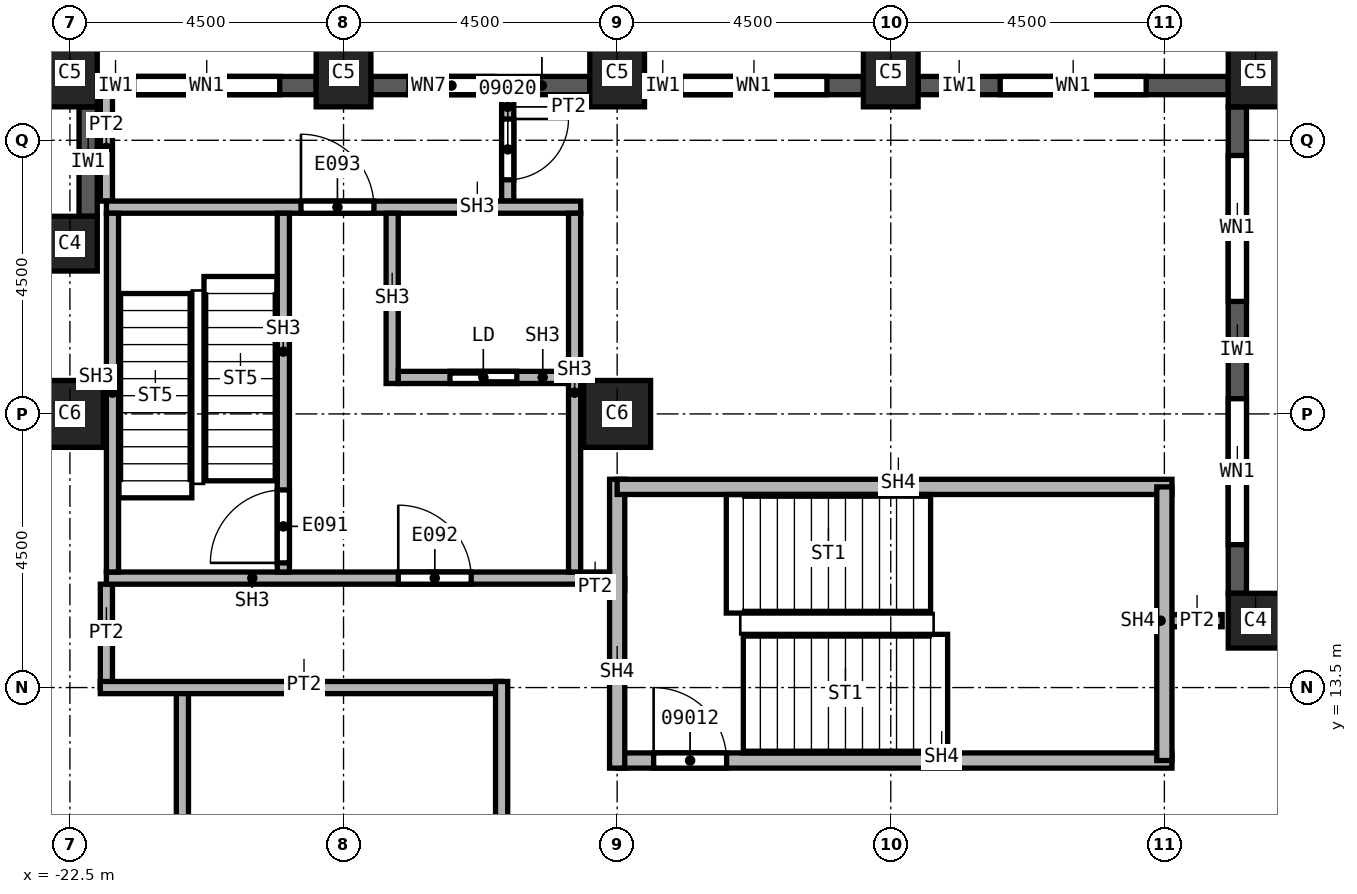
"""IFC4 building model, lengths in metres.
Left out: names, types, materials, properties, quantities, classifications, styles, units other than length and angle.
Written with IfcOpenShell. Run it as: python <this file> out.ifc"""

import sys

from ifc_helpers import new_model, si_unit, direction, frame, frame_2d, origin, origin_2d, place, context, subcontext, project, spatial, rectangle, extrude, element, fill, save


model = new_model("IFC4")
c1 = context("Model", 3, precision=1e-05, world=origin(), true_north=direction((0.0, 1.0)))
c2 = subcontext(c1, "Body", "Model", "MODEL_VIEW")
j1 = project(units=[si_unit("LENGTHUNIT", "METRE"), si_unit("PLANEANGLEUNIT", "RADIAN")], contexts=[c1])
p1 = place(None, origin())
s1 = spatial("IfcSite", under=j1, at=p1, CompositionType="ELEMENT")
p2 = place(p1, origin())
s2 = spatial("IfcBuilding", under=s1, at=p2, CompositionType="ELEMENT")
p3 = place(p2, frame((0.0, 0.0, 162.0)))
s3 = spatial("IfcBuildingStorey", under=s2, at=p3, CompositionType="ELEMENT", Elevation=162.0)
for number, where, z_axis, x_axis in (
    (1, (-13.5, 18.0, 0.0), (0.0, 0.0, 1.0), (1.0, 0.0, 0.0)),
    (2, (-22.5, 18.0, 0.0), (0.0, 0.0, 1.0), (1.0, 0.0, 0.0)),
):
    element("IfcColumn", number, at=place(p3, frame(where, z_axis=z_axis, x_axis=x_axis)), inside=s3, PredefinedType="COLUMN", context=c2, shape_type="SweptSolid", body=[
        extrude(rectangle(XDim=1.1, YDim=1.1, at=origin_2d()), origin(), (0.0, 0.0, 1.0), 3.7),
    ])
for number, where, z_axis, x_axis in (
    (3, (-3.0, 23.6, 0.0), (0.0, 0.0, 1.0), (1.0, 0.0, 0.0)),
    (4, (-9.0, 23.6, 0.0), (0.0, 0.0, 1.0), (1.0, 0.0, 0.0)),
    (5, (-13.5, 23.6, 0.0), (0.0, 0.0, 1.0), (1.0, 0.0, 0.0)),
    (6, (-18.0, 23.6, 0.0), (0.0, 0.0, 1.0), (1.0, 0.0, 0.0)),
    (7, (-22.5, 23.6, 0.0), (0.0, 0.0, 1.0), (1.0, 0.0, 0.0)),
):
    element("IfcColumn", number, at=place(p3, frame(where, z_axis=z_axis, x_axis=x_axis)), inside=s3, PredefinedType="COLUMN", context=c2, shape_type="SweptSolid", body=[
        extrude(rectangle(XDim=0.9, YDim=1.1, at=origin_2d()), origin(), (0.0, 0.0, 1.0), 3.7),
    ])
for number, where, z_axis, x_axis in (
    (8, (-3.0, 14.6, 0.0), (0.0, 0.0, 1.0), (1.0, 0.0, 0.0)),
    (9, (-22.5, 20.8, 0.0), (0.0, 0.0, 1.0), (1.0, 0.0, 0.0)),
):
    element("IfcColumn", number, at=place(p3, frame(where, z_axis=z_axis, x_axis=x_axis)), inside=s3, PredefinedType="COLUMN", context=c2, shape_type="SweptSolid", body=[
        extrude(rectangle(XDim=0.9, YDim=0.9, at=origin_2d()), origin(), (0.0, 0.0, 1.0), 3.7),
    ])
p4 = place(p3, frame((-22.2, 23.05, 0.0), z_axis=(0.0, 0.0, 1.0), x_axis=(0.0, -1.0, 0.0)))
e10 = element("IfcWall", 10, at=p4, inside=s3, PredefinedType="SOLIDWALL", context=c2, shape_type="SweptSolid", body=[
    extrude(rectangle(XDim=1.8, YDim=0.3, at=frame_2d((0.9, 0.0))), origin(), (0.0, 0.0, 1.0), 3.1),
])
p5 = place(p3, frame((-3.3, 15.05, 0.0), z_axis=(0.0, 0.0, 1.0), x_axis=(0.0, 1.0, 0.0)))
e11 = element("IfcWall", 11, at=p5, inside=s3, PredefinedType="SOLIDWALL", context=c2, shape_type="SweptSolid", body=[
    extrude(rectangle(XDim=8.0, YDim=0.3, at=frame_2d((4.0, 0.0))), origin(), (0.0, 0.0, 1.0), 3.1),
])
p6 = place(p5, frame((0.8, 0.0, 0.8)))
e12 = element("IfcOpeningElement", 12, at=p6, cuts=e11, PredefinedType="OPENING", context=c2, shape_type="SweptSolid", body=[
    extrude(rectangle(XDim=2.4, YDim=1.95, at=frame_2d((1.2, 0.975))), frame((0.0, 0.15, 0.0), z_axis=(0.0, -1.0, 0.0), x_axis=(1.0, 0.0, 0.0)), (0.0, 0.0, 1.0), 0.3),
])
p7 = place(p5, frame((4.8, 0.0, 0.8)))
e13 = element("IfcOpeningElement", 13, at=p7, cuts=e11, PredefinedType="OPENING", context=c2, shape_type="SweptSolid", body=[
    extrude(rectangle(XDim=2.4, YDim=1.95, at=frame_2d((1.2, 0.975))), frame((0.0, 0.15, 0.0), z_axis=(0.0, -1.0, 0.0), x_axis=(1.0, 0.0, 0.0)), (0.0, 0.0, 1.0), 0.3),
])
p8 = place(p3, frame((-3.45, 23.4, 0.0), z_axis=(0.0, 0.0, 1.0), x_axis=(-1.0, 0.0, 0.0)))
e14 = element("IfcWall", 14, at=p8, inside=s3, PredefinedType="SOLIDWALL", context=c2, shape_type="SweptSolid", body=[
    extrude(rectangle(XDim=5.1, YDim=0.3, at=frame_2d((2.55, 0.0))), origin(), (0.0, 0.0, 1.0), 3.1),
])
p9 = place(p8, frame((1.35, 0.0, 0.8)))
e15 = element("IfcOpeningElement", 15, at=p9, cuts=e14, PredefinedType="OPENING", context=c2, shape_type="SweptSolid", body=[
    extrude(rectangle(XDim=2.4, YDim=1.95, at=frame_2d((1.2, 0.975))), frame((0.0, 0.15, 0.0), z_axis=(0.0, -1.0, 0.0), x_axis=(1.0, 0.0, 0.0)), (0.0, 0.0, 1.0), 0.3),
])
p10 = place(p3, frame((-9.45, 23.4, 0.0), z_axis=(0.0, 0.0, 1.0), x_axis=(-1.0, 0.0, 0.0)))
e16 = element("IfcWall", 16, at=p10, inside=s3, PredefinedType="SOLIDWALL", context=c2, shape_type="SweptSolid", body=[
    extrude(rectangle(XDim=3.6, YDim=0.3, at=frame_2d((1.8, 0.0))), origin(), (0.0, 0.0, 1.0), 3.1),
])
p11 = place(p10, frame((0.6, 0.0, 0.8)))
e17 = element("IfcOpeningElement", 17, at=p11, cuts=e16, PredefinedType="OPENING", context=c2, shape_type="SweptSolid", body=[
    extrude(rectangle(XDim=2.4, YDim=1.95, at=frame_2d((1.2, 0.975))), frame((0.0, 0.15, 0.0), z_axis=(0.0, -1.0, 0.0), x_axis=(1.0, 0.0, 0.0)), (0.0, 0.0, 1.0), 0.3),
])
p12 = place(p3, frame((-13.95, 23.4, 0.0), z_axis=(0.0, 0.0, 1.0), x_axis=(-1.0, 0.0, 0.0)))
e18 = element("IfcWall", 18, at=p12, inside=s3, PredefinedType="SOLIDWALL", context=c2, shape_type="SweptSolid", body=[
    extrude(rectangle(XDim=3.6, YDim=0.3, at=frame_2d((1.8, 0.0))), origin(), (0.0, 0.0, 1.0), 3.1),
])
p13 = place(p12, frame((1.575, 0.0, 0.8)))
e19 = element("IfcOpeningElement", 19, at=p13, cuts=e18, PredefinedType="OPENING", context=c2, shape_type="SweptSolid", body=[
    extrude(rectangle(XDim=1.4, YDim=1.95, at=frame_2d((0.7, 0.975))), frame((0.0, 0.15, 0.0), z_axis=(0.0, -1.0, 0.0), x_axis=(1.0, 0.0, 0.0)), (0.0, 0.0, 1.0), 0.3),
])
p14 = place(p3, frame((-18.45, 23.4, 0.0), z_axis=(0.0, 0.0, 1.0), x_axis=(-1.0, 0.0, 0.0)))
e20 = element("IfcWall", 20, at=p14, inside=s3, PredefinedType="SOLIDWALL", context=c2, shape_type="SweptSolid", body=[
    extrude(rectangle(XDim=3.6, YDim=0.3, at=frame_2d((1.8, 0.0))), origin(), (0.0, 0.0, 1.0), 3.1),
])
p15 = place(p14, frame((0.6, 0.0, 0.8)))
e21 = element("IfcOpeningElement", 21, at=p15, cuts=e20, PredefinedType="OPENING", context=c2, shape_type="SweptSolid", body=[
    extrude(rectangle(XDim=2.4, YDim=1.95, at=frame_2d((1.2, 0.975))), frame((0.0, 0.15, 0.0), z_axis=(0.0, -1.0, 0.0), x_axis=(1.0, 0.0, 0.0)), (0.0, 0.0, 1.0), 0.3),
])
p16 = place(p3, frame((-21.9, 13.5, 0.0), z_axis=(0.0, 0.0, 1.0), x_axis=(0.0, 1.0, 0.0)))
e22 = element("IfcWall", 22, at=p16, inside=s3, PredefinedType="PARTITIONING", context=c2, shape_type="SweptSolid", body=[
    extrude(rectangle(XDim=1.7, YDim=0.2, at=frame_2d((0.85, 0.0))), origin(), (0.0, 0.0, 1.0), 3.7),
])
p17 = place(p3, frame((-21.9, 21.5, 0.0), z_axis=(0.0, 0.0, 1.0), x_axis=(0.0, 1.0, 0.0)))
e23 = element("IfcWall", 23, at=p17, inside=s3, PredefinedType="PARTITIONING", context=c2, shape_type="SweptSolid", body=[
    extrude(rectangle(XDim=1.75, YDim=0.2, at=frame_2d((0.875, 0.0))), origin(), (0.0, 0.0, 1.0), 3.7),
])
p18 = place(p3, frame((-20.65, 3.75, 0.0), z_axis=(0.0, 0.0, 1.0), x_axis=(0.0, 1.0, 0.0)))
e24 = element("IfcWall", 24, at=p18, inside=s3, PredefinedType="PARTITIONING", context=c2, shape_type="SweptSolid", body=[
    extrude(rectangle(XDim=9.75, YDim=0.2, at=frame_2d((4.875, 0.0))), origin(), (0.0, 0.0, 1.0), 3.7),
])
p19 = place(p18, frame((2.65, 0.0, 0.0)))
e25 = element("IfcOpeningElement", 25, at=p19, cuts=e24, PredefinedType="OPENING", context=c2, shape_type="SweptSolid", body=[
    extrude(rectangle(XDim=1.0, YDim=2.1, at=frame_2d((0.5, 1.05))), frame((0.0, 0.1, 0.0), z_axis=(0.0, -1.0, 0.0), x_axis=(1.0, 0.0, 0.0)), (0.0, 0.0, 1.0), 0.2),
])
p20 = place(p3, frame((-15.4, 13.5, 0.0), z_axis=(0.0, 0.0, 1.0), x_axis=(-1.0, 0.0, 0.0)))
e26 = element("IfcWall", 26, at=p20, inside=s3, PredefinedType="PARTITIONING", context=c2, shape_type="SweptSolid", body=[
    extrude(rectangle(XDim=6.6, YDim=0.2, at=frame_2d((3.3, 0.0))), origin(), (0.0, 0.0, 1.0), 3.7),
])
p21 = place(p3, frame((-15.4, 3.65, 0.0), z_axis=(0.0, 0.0, 1.0), x_axis=(0.0, 1.0, 0.0)))
e27 = element("IfcWall", 27, at=p21, inside=s3, PredefinedType="PARTITIONING", context=c2, shape_type="SweptSolid", body=[
    extrude(rectangle(XDim=9.95, YDim=0.2, at=frame_2d((4.975, 0.0))), origin(), (0.0, 0.0, 1.0), 3.7),
])
p22 = place(p21, frame((3.55, 0.0, 0.0)))
e28 = element("IfcOpeningElement", 28, at=p22, cuts=e27, PredefinedType="OPENING", context=c2, shape_type="SweptSolid", body=[
    extrude(rectangle(XDim=1.0, YDim=2.1, at=frame_2d((0.5, 1.05))), frame((0.0, 0.1, 0.0), z_axis=(0.0, -1.0, 0.0), x_axis=(1.0, 0.0, 0.0)), (0.0, 0.0, 1.0), 0.2),
])
p23 = place(p3, frame((-15.3, 23.25, 0.0), z_axis=(0.0, 0.0, 1.0), x_axis=(0.0, -1.0, 0.0)))
e29 = element("IfcWall", 29, at=p23, inside=s3, PredefinedType="PARTITIONING", context=c2, shape_type="SweptSolid", body=[
    extrude(rectangle(XDim=1.75, YDim=0.2, at=frame_2d((0.875, 0.0))), origin(), (0.0, 0.0, 1.0), 3.7),
])
p24 = place(p23, frame((0.4, 0.0, 0.0)))
e30 = element("IfcOpeningElement", 30, at=p24, cuts=e29, PredefinedType="OPENING", context=c2, shape_type="SweptSolid", body=[
    extrude(rectangle(XDim=1.0, YDim=2.1, at=frame_2d((0.5, 1.05))), frame((0.0, 0.1, 0.0), z_axis=(0.0, -1.0, 0.0), x_axis=(1.0, 0.0, 0.0)), (0.0, 0.0, 1.0), 0.2),
])
p25 = place(p3, frame((-14.1, 15.2, 0.0), z_axis=(0.0, 0.0, 1.0), x_axis=(1.0, 0.0, 0.0)))
e31 = element("IfcWall", 31, at=p25, inside=s3, PredefinedType="PARTITIONING", context=c2, shape_type="SweptSolid", body=[
    extrude(rectangle(XDim=0.725, YDim=0.2, at=frame_2d((0.363, 0.0))), origin(), (0.0, 0.0, 1.0), 3.7),
])
p26 = place(p3, frame((-4.5, 14.6, 0.0), z_axis=(0.0, 0.0, 1.0), x_axis=(1.0, 0.0, 0.0)))
e32 = element("IfcWall", 32, at=p26, inside=s3, PredefinedType="PARTITIONING", context=c2, shape_type="SweptSolid", body=[
    extrude(rectangle(XDim=0.95, YDim=0.2, at=frame_2d((0.475, 0.0))), origin(), (0.0, 0.0, 1.0), 3.7),
])
p27 = place(p3, frame((-13.5, 12.3, 0.0), z_axis=(0.0, 0.0, 1.0), x_axis=(1.0, 0.0, 0.0)))
e33 = element("IfcWall", 33, at=p27, inside=s3, PredefinedType="SOLIDWALL", context=c2, shape_type="SweptSolid", body=[
    extrude(rectangle(XDim=9.125, YDim=0.25, at=frame_2d((4.562, 0.0))), origin(), (0.0, 0.0, 1.0), 3.7),
])
p28 = place(p27, frame((0.6, 0.0, 0.0)))
e34 = element("IfcOpeningElement", 34, at=p28, cuts=e33, PredefinedType="OPENING", context=c2, shape_type="SweptSolid", body=[
    extrude(rectangle(XDim=1.2, YDim=2.1, at=frame_2d((0.6, 1.05))), frame((0.0, 0.125, 0.0), z_axis=(0.0, -1.0, 0.0), x_axis=(1.0, 0.0, 0.0)), (0.0, 0.0, 1.0), 0.25),
])
p29 = place(p3, frame((-13.5, 12.175, 0.0), z_axis=(0.0, 0.0, 1.0), x_axis=(0.0, 1.0, 0.0)))
e35 = element("IfcWall", 35, at=p29, inside=s3, PredefinedType="SOLIDWALL", context=c2, shape_type="SweptSolid", body=[
    extrude(rectangle(XDim=4.75, YDim=0.25, at=frame_2d((2.375, 0.0))), origin(), (0.0, 0.0, 1.0), 3.7),
])
p30 = place(p3, frame((-13.5, 16.8, 0.0), z_axis=(0.0, 0.0, 1.0), x_axis=(1.0, 0.0, 0.0)))
e36 = element("IfcWall", 36, at=p30, inside=s3, PredefinedType="SOLIDWALL", context=c2, shape_type="SweptSolid", body=[
    extrude(rectangle(XDim=9.125, YDim=0.25, at=frame_2d((4.562, 0.0))), origin(), (0.0, 0.0, 1.0), 3.7),
])
p31 = place(p3, frame((-4.5, 16.8, 0.0), z_axis=(0.0, 0.0, 1.0), x_axis=(0.0, -1.0, 0.0)))
e37 = element("IfcWall", 37, at=p31, inside=s3, PredefinedType="SOLIDWALL", context=c2, shape_type="SweptSolid", body=[
    extrude(rectangle(XDim=4.5, YDim=0.25, at=frame_2d((2.25, 0.0))), origin(), (0.0, 0.0, 1.0), 3.7),
])
p32 = place(p3, frame((-21.9, 15.3, 0.0), z_axis=(0.0, 0.0, 1.0), x_axis=(1.0, 0.0, 0.0)))
e38 = element("IfcWall", 38, at=p32, inside=s3, PredefinedType="SOLIDWALL", context=c2, shape_type="SweptSolid", body=[
    extrude(rectangle(XDim=8.275, YDim=0.2, at=frame_2d((4.137, 0.0))), origin(), (0.0, 0.0, 1.0), 3.7),
])
p33 = place(p32, frame((4.8, 0.0, 0.0)))
e39 = element("IfcOpeningElement", 39, at=p33, cuts=e38, PredefinedType="OPENING", context=c2, shape_type="SweptSolid", body=[
    extrude(rectangle(XDim=1.2, YDim=2.1, at=frame_2d((0.6, 1.05))), frame((0.0, 0.1, 0.0), z_axis=(0.0, -1.0, 0.0), x_axis=(1.0, 0.0, 0.0)), (0.0, 0.0, 1.0), 0.2),
])
p34 = place(p3, frame((-21.9, 21.4, 0.0), z_axis=(0.0, 0.0, 1.0), x_axis=(1.0, 0.0, 0.0)))
e40 = element("IfcWall", 40, at=p34, inside=s3, PredefinedType="SOLIDWALL", context=c2, shape_type="SweptSolid", body=[
    extrude(rectangle(XDim=7.8, YDim=0.2, at=frame_2d((3.9, 0.0))), origin(), (0.0, 0.0, 1.0), 3.7),
])
p35 = place(p34, frame((3.2, 0.0, 0.0)))
e41 = element("IfcOpeningElement", 41, at=p35, cuts=e40, PredefinedType="OPENING", context=c2, shape_type="SweptSolid", body=[
    extrude(rectangle(XDim=1.2, YDim=2.1, at=frame_2d((0.6, 1.05))), frame((0.0, 0.1, 0.0), z_axis=(0.0, -1.0, 0.0), x_axis=(1.0, 0.0, 0.0)), (0.0, 0.0, 1.0), 0.2),
])
for number, where, z_axis, x_axis in (
    (42, (-21.8, 15.4, 0.0), (0.0, 0.0, 1.0), (0.0, 1.0, 0.0)),
    (43, (-14.2, 15.4, 0.0), (0.0, 0.0, 1.0), (0.0, 1.0, 0.0)),
):
    element("IfcWall", number, at=place(p3, frame(where, z_axis=z_axis, x_axis=x_axis)), inside=s3, PredefinedType="SOLIDWALL", context=c2, shape_type="SweptSolid", body=[
        extrude(rectangle(XDim=5.9, YDim=0.2, at=frame_2d((2.95, 0.0))), origin(), (0.0, 0.0, 1.0), 3.7),
    ])
p36 = place(p3, frame((-18.99, 15.4, 0.0), z_axis=(0.0, 0.0, 1.0), x_axis=(0.0, 1.0, 0.0)))
e44 = element("IfcWall", 44, at=p36, inside=s3, PredefinedType="SOLIDWALL", context=c2, shape_type="SweptSolid", body=[
    extrude(rectangle(XDim=5.9, YDim=0.2, at=frame_2d((2.95, 0.0))), origin(), (0.0, 0.0, 1.0), 3.7),
])
p37 = place(p36, frame((0.15, 0.0, 0.0)))
e45 = element("IfcOpeningElement", 45, at=p37, cuts=e44, PredefinedType="OPENING", context=c2, shape_type="SweptSolid", body=[
    extrude(rectangle(XDim=1.2, YDim=2.1, at=frame_2d((0.6, 1.05))), frame((0.0, 0.1, 0.0), z_axis=(0.0, -1.0, 0.0), x_axis=(1.0, 0.0, 0.0)), (0.0, 0.0, 1.0), 0.2),
])
p38 = place(p3, frame((-17.2, 18.5, 0.0), z_axis=(0.0, 0.0, 1.0), x_axis=(0.0, 1.0, 0.0)))
e46 = element("IfcWall", 46, at=p38, inside=s3, PredefinedType="SOLIDWALL", context=c2, shape_type="SweptSolid", body=[
    extrude(rectangle(XDim=2.8, YDim=0.2, at=frame_2d((1.4, 0.0))), origin(), (0.0, 0.0, 1.0), 3.7),
])
p39 = place(p3, frame((-17.1, 18.6, 0.0), z_axis=(0.0, 0.0, 1.0), x_axis=(1.0, 0.0, 0.0)))
e47 = element("IfcWall", 47, at=p39, inside=s3, PredefinedType="SOLIDWALL", context=c2, shape_type="SweptSolid", body=[
    extrude(rectangle(XDim=2.8, YDim=0.2, at=frame_2d((1.4, 0.0))), origin(), (0.0, 0.0, 1.0), 3.7),
])
p40 = place(p39, frame((0.85, 0.0, 0.0)))
e48 = element("IfcOpeningElement", 48, at=p40, cuts=e47, PredefinedType="OPENING", context=c2, shape_type="SweptSolid", body=[
    extrude(rectangle(XDim=1.1, YDim=2.1, at=frame_2d((0.55, 1.05))), frame((0.0, 0.1, 0.0), z_axis=(0.0, -1.0, 0.0), x_axis=(1.0, 0.0, 0.0)), (0.0, 0.0, 1.0), 0.2),
])
p41 = place(p6, origin())
e49 = element("IfcWindow", 49, at=p41, inside=s3, PartitioningType="SINGLE_PANEL", PredefinedType="WINDOW", context=c2, shape_type="SweptSolid", body=[
    extrude(rectangle(XDim=2.4, YDim=1.95, at=frame_2d((1.2, 0.975))), frame((0.0, 0.03, 0.0), z_axis=(0.0, -1.0, 0.0), x_axis=(1.0, 0.0, 0.0)), (0.0, 0.0, 1.0), 0.06),
])
fill(e12, e49)
p42 = place(p7, origin())
e50 = element("IfcWindow", 50, at=p42, inside=s3, PartitioningType="SINGLE_PANEL", PredefinedType="WINDOW", context=c2, shape_type="SweptSolid", body=[
    extrude(rectangle(XDim=2.4, YDim=1.95, at=frame_2d((1.2, 0.975))), frame((0.0, 0.03, 0.0), z_axis=(0.0, -1.0, 0.0), x_axis=(1.0, 0.0, 0.0)), (0.0, 0.0, 1.0), 0.06),
])
fill(e13, e50)
p43 = place(p9, origin())
e51 = element("IfcWindow", 51, at=p43, inside=s3, PartitioningType="SINGLE_PANEL", PredefinedType="WINDOW", context=c2, shape_type="SweptSolid", body=[
    extrude(rectangle(XDim=2.4, YDim=1.95, at=frame_2d((1.2, 0.975))), frame((0.0, 0.03, 0.0), z_axis=(0.0, -1.0, 0.0), x_axis=(1.0, 0.0, 0.0)), (0.0, 0.0, 1.0), 0.06),
])
fill(e15, e51)
p44 = place(p11, origin())
e52 = element("IfcWindow", 52, at=p44, inside=s3, PartitioningType="SINGLE_PANEL", PredefinedType="WINDOW", context=c2, shape_type="SweptSolid", body=[
    extrude(rectangle(XDim=2.4, YDim=1.95, at=frame_2d((1.2, 0.975))), frame((0.0, 0.03, 0.0), z_axis=(0.0, -1.0, 0.0), x_axis=(1.0, 0.0, 0.0)), (0.0, 0.0, 1.0), 0.06),
])
fill(e17, e52)
p45 = place(p15, origin())
e53 = element("IfcWindow", 53, at=p45, inside=s3, PartitioningType="SINGLE_PANEL", PredefinedType="WINDOW", context=c2, shape_type="SweptSolid", body=[
    extrude(rectangle(XDim=2.4, YDim=1.95, at=frame_2d((1.2, 0.975))), frame((0.0, 0.03, 0.0), z_axis=(0.0, -1.0, 0.0), x_axis=(1.0, 0.0, 0.0)), (0.0, 0.0, 1.0), 0.06),
])
fill(e21, e53)
p46 = place(p28, origin())
e54 = element("IfcDoor", 54, at=p46, inside=s3, OperationType="SINGLE_SWING_LEFT", PredefinedType="DOOR", context=c2, shape_type="SweptSolid", body=[
    extrude(rectangle(XDim=1.2, YDim=2.1, at=frame_2d((0.6, 1.05))), frame((0.0, 0.025, 0.0), z_axis=(0.0, -1.0, 0.0), x_axis=(1.0, 0.0, 0.0)), (0.0, 0.0, 1.0), 0.05),
])
fill(e34, e54)
p47 = place(p24, origin())
e55 = element("IfcDoor", 55, at=p47, inside=s3, OperationType="SINGLE_SWING_LEFT", PredefinedType="DOOR", context=c2, shape_type="SweptSolid", body=[
    extrude(rectangle(XDim=1.0, YDim=2.1, at=frame_2d((0.5, 1.05))), frame((0.0, 0.025, 0.0), z_axis=(0.0, -1.0, 0.0), x_axis=(1.0, 0.0, 0.0)), (0.0, 0.0, 1.0), 0.05),
])
fill(e30, e55)
p48 = place(p37, origin())
e56 = element("IfcDoor", 56, at=p48, inside=s3, OperationType="SINGLE_SWING_LEFT", PredefinedType="DOOR", context=c2, shape_type="SweptSolid", body=[
    extrude(rectangle(XDim=1.2, YDim=2.1, at=frame_2d((0.6, 1.05))), frame((0.0, 0.025, 0.0), z_axis=(0.0, -1.0, 0.0), x_axis=(1.0, 0.0, 0.0)), (0.0, 0.0, 1.0), 0.05),
])
fill(e45, e56)
p49 = place(p40, origin())
e57 = element("IfcDoor", 57, at=p49, inside=s3, OperationType="SLIDING_TO_LEFT", PredefinedType="DOOR", context=c2, shape_type="SweptSolid", body=[
    extrude(rectangle(XDim=1.1, YDim=2.1, at=frame_2d((0.55, 1.05))), frame((0.0, 0.025, 0.0), z_axis=(0.0, -1.0, 0.0), x_axis=(1.0, 0.0, 0.0)), (0.0, 0.0, 1.0), 0.05),
])
fill(e48, e57)
p50 = place(p33, origin())
e58 = element("IfcDoor", 58, at=p50, inside=s3, OperationType="SINGLE_SWING_RIGHT", PredefinedType="DOOR", context=c2, shape_type="SweptSolid", body=[
    extrude(rectangle(XDim=1.2, YDim=2.1, at=frame_2d((0.6, 1.05))), frame((0.0, 0.025, 0.0), z_axis=(0.0, -1.0, 0.0), x_axis=(1.0, 0.0, 0.0)), (0.0, 0.0, 1.0), 0.05),
])
fill(e39, e58)
p51 = place(p35, origin())
e59 = element("IfcDoor", 59, at=p51, inside=s3, OperationType="SINGLE_SWING_LEFT", PredefinedType="DOOR", context=c2, shape_type="SweptSolid", body=[
    extrude(rectangle(XDim=1.2, YDim=2.1, at=frame_2d((0.6, 1.05))), frame((0.0, 0.025, 0.0), z_axis=(0.0, -1.0, 0.0), x_axis=(1.0, 0.0, 0.0)), (0.0, 0.0, 1.0), 0.05),
])
fill(e41, e59)
p52 = place(p13, origin())
e60 = element("IfcWindow", 60, at=p52, inside=s3, PartitioningType="SINGLE_PANEL", PredefinedType="WINDOW", context=c2, shape_type="SweptSolid", body=[
    extrude(rectangle(XDim=1.4, YDim=1.95, at=frame_2d((0.7, 0.975))), frame((0.0, 0.03, 0.0), z_axis=(0.0, -1.0, 0.0), x_axis=(1.0, 0.0, 0.0)), (0.0, 0.0, 1.0), 0.06),
])
fill(e19, e60)
save(model, sys.argv[1])
